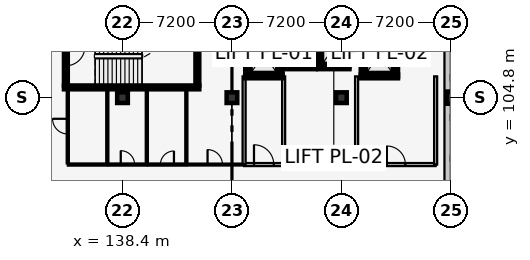
"""IFC4 building model, lengths in metres.
Left out: names, types, materials, properties, quantities, classifications, styles, units other than length and angle.
Written with IfcOpenShell. Run it as: python <this file> out.ifc"""

import sys

from ifc_helpers import new_model, si_unit, direction, frame, frame_2d, origin, origin_2d, place, context, subcontext, project, spatial, rectangle, extrude, element, fill, save


model = new_model("IFC4")
c1 = context("Model", 3, precision=1e-05, world=origin(), true_north=direction((0.0, 1.0)))
c2 = subcontext(c1, "Body", "Model", "MODEL_VIEW")
j1 = project(units=[si_unit("LENGTHUNIT", "METRE"), si_unit("PLANEANGLEUNIT", "RADIAN")], contexts=[c1])
p1 = place(None, origin())
s1 = spatial("IfcSite", under=j1, at=p1, CompositionType="ELEMENT")
p2 = place(p1, origin())
s2 = spatial("IfcBuilding", under=s1, at=p2, CompositionType="ELEMENT")
p3 = place(p2, frame((0.0, 0.0, 18.0)))
s3 = spatial("IfcBuildingStorey", under=s2, at=p3, CompositionType="ELEMENT", Elevation=18.0)
for number, where, z_axis, x_axis in (
    (1, (138.4, 104.8, 0.0), (0.0, 0.0, 1.0), (1.0, 0.0, 0.0)),
    (2, (145.6, 104.8, 0.0), (0.0, 0.0, 1.0), (1.0, 0.0, 0.0)),
    (3, (152.8, 104.8, 0.0), (0.0, 0.0, 1.0), (1.0, 0.0, 0.0)),
):
    element("IfcColumn", number, at=place(p3, frame(where, z_axis=z_axis, x_axis=x_axis)), inside=s3, PredefinedType="COLUMN", context=c2, shape_type="SweptSolid", body=[
        extrude(rectangle(XDim=0.7, YDim=0.7, at=origin_2d()), origin(), (0.0, 0.0, 1.0), 3.9),
    ])
p4 = place(p3, frame((160.0, 104.8, 0.0), z_axis=(0.0, 0.0, 1.0), x_axis=(1.0, 0.0, 0.0)))
e4 = element("IfcColumn", 4, at=p4, inside=s3, PredefinedType="COLUMN", context=c2, shape_type="SweptSolid", body=[
    extrude(rectangle(XDim=0.55, YDim=0.8, at=origin_2d()), origin(), (0.0, 0.0, 1.0), 3.9),
])
p5 = place(p3, frame((159.79, 112.0, 0.0), z_axis=(0.0, 0.0, 1.0), x_axis=(0.0, -1.0, 0.0)))
e5 = element("IfcWall", 5, at=p5, inside=s3, PredefinedType="SOLIDWALL", context=c2, shape_type="SweptSolid", body=[
    extrude(rectangle(XDim=28.8, YDim=0.42, at=frame_2d((14.4, 0.0))), origin(), (0.0, 0.0, 1.0), 3.055),
])
p6 = place(p3, frame((134.55, 105.475, 0.0), z_axis=(0.0, 0.0, 1.0), x_axis=(1.0, 0.0, 0.0)))
e6 = element("IfcWall", 6, at=p6, inside=s3, PredefinedType="SHEAR", context=c2, shape_type="SweptSolid", body=[
    extrude(rectangle(XDim=8.9, YDim=0.25, at=frame_2d((4.45, 0.0))), origin(), (0.0, 0.0, 1.0), 3.66),
])
p7 = place(p3, frame((134.675, 109.45, 0.0), z_axis=(0.0, 0.0, 1.0), x_axis=(0.0, -1.0, 0.0)))
e7 = element("IfcWall", 7, at=p7, inside=s3, PredefinedType="SHEAR", context=c2, shape_type="SweptSolid", body=[
    extrude(rectangle(XDim=3.85, YDim=0.25, at=frame_2d((1.925, 0.0))), origin(), (0.0, 0.0, 1.0), 3.66),
])
p8 = place(p7, frame((1.3, 0.0, 0.0)))
e8 = element("IfcOpeningElement", 8, at=p8, cuts=e7, PredefinedType="OPENING", context=c2, shape_type="SweptSolid", body=[
    extrude(rectangle(XDim=1.25, YDim=2.15, at=frame_2d((0.625, 1.075))), frame((0.0, 0.137, 0.0), z_axis=(0.0, -1.0, 0.0), x_axis=(1.0, 0.0, 0.0)), (0.0, 0.0, 1.0), 0.274),
])
p9 = place(p3, frame((143.325, 105.6, 0.0), z_axis=(0.0, 0.0, 1.0), x_axis=(0.0, 1.0, 0.0)))
e9 = element("IfcWall", 9, at=p9, inside=s3, PredefinedType="SHEAR", context=c2, shape_type="SweptSolid", body=[
    extrude(rectangle(XDim=3.85, YDim=0.25, at=frame_2d((1.925, 0.0))), origin(), (0.0, 0.0, 1.0), 3.66),
])
p10 = place(p3, frame((146.475, 106.2, 0.0), z_axis=(0.0, 0.0, 1.0), x_axis=(1.0, 0.0, 0.0)))
e10 = element("IfcWall", 10, at=p10, inside=s3, PredefinedType="SHEAR", context=c2, shape_type="SweptSolid", body=[
    extrude(rectangle(XDim=2.45, YDim=0.25, at=frame_2d((1.225, 0.0))), origin(), (0.0, 0.0, 1.0), 3.66),
])
p11 = place(p10, frame((0.675, 0.0, 0.0)))
e11 = element("IfcOpeningElement", 11, at=p11, cuts=e10, PredefinedType="OPENING", context=c2, shape_type="SweptSolid", body=[
    extrude(rectangle(XDim=1.1, YDim=2.15, at=frame_2d((0.55, 1.075))), frame((0.0, 0.137, 0.0), z_axis=(0.0, -1.0, 0.0), x_axis=(1.0, 0.0, 0.0)), (0.0, 0.0, 1.0), 0.274),
])
for number, where, z_axis, x_axis in (
    (12, (146.6, 109.2, 0.0), (0.0, 0.0, 1.0), (0.0, -1.0, 0.0)),
    (13, (148.8, 106.2, 0.0), (0.0, 0.0, 1.0), (0.0, 1.0, 0.0)),
):
    element("IfcWall", number, at=place(p3, frame(where, z_axis=z_axis, x_axis=x_axis)), inside=s3, PredefinedType="SHEAR", context=c2, shape_type="SweptSolid", body=[
        extrude(rectangle(XDim=3.0, YDim=0.25, at=frame_2d((1.5, 0.0))), origin(), (0.0, 0.0, 1.0), 3.66),
    ])
p12 = place(p3, frame((146.4, 100.4, 0.0), z_axis=(0.0, 0.0, 1.0), x_axis=(1.0, 0.0, 0.0)))
e14 = element("IfcWall", 14, at=p12, inside=s3, PredefinedType="PARTITIONING", context=c2, shape_type="SweptSolid", body=[
    extrude(rectangle(XDim=2.6, YDim=0.2, at=frame_2d((1.3, 0.0))), origin(), (0.0, 0.0, 1.0), 3.66),
])
p13 = place(p12, frame((0.65, 0.0, 0.0)))
e15 = element("IfcOpeningElement", 15, at=p13, cuts=e14, PredefinedType="OPENING", context=c2, shape_type="SweptSolid", body=[
    extrude(rectangle(XDim=1.3, YDim=2.2, at=frame_2d((0.65, 1.1))), frame((0.0, 0.112, 0.0), z_axis=(0.0, -1.0, 0.0), x_axis=(1.0, 0.0, 0.0)), (0.0, 0.0, 1.0), 0.224),
])
p14 = place(p3, frame((146.4, 106.2, 0.0), z_axis=(0.0, 0.0, 1.0), x_axis=(0.0, -1.0, 0.0)))
e16 = element("IfcWall", 16, at=p14, inside=s3, PredefinedType="PARTITIONING", context=c2, shape_type="SweptSolid", body=[
    extrude(rectangle(XDim=5.8, YDim=0.2, at=frame_2d((2.9, 0.0))), origin(), (0.0, 0.0, 1.0), 3.66),
])
p15 = place(p3, frame((149.0, 100.4, 0.0), z_axis=(0.0, 0.0, 1.0), x_axis=(0.0, 1.0, 0.0)))
e17 = element("IfcWall", 17, at=p15, inside=s3, PredefinedType="PARTITIONING", context=c2, shape_type="SweptSolid", body=[
    extrude(rectangle(XDim=5.8, YDim=0.2, at=frame_2d((2.9, 0.0))), origin(), (0.0, 0.0, 1.0), 3.325),
])
p16 = place(p3, frame((154.075, 106.2, 0.0), z_axis=(0.0, 0.0, 1.0), x_axis=(1.0, 0.0, 0.0)))
e18 = element("IfcWall", 18, at=p16, inside=s3, PredefinedType="SHEAR", context=c2, shape_type="SweptSolid", body=[
    extrude(rectangle(XDim=2.45, YDim=0.25, at=frame_2d((1.225, 0.0))), origin(), (0.0, 0.0, 1.0), 3.66),
])
p17 = place(p16, frame((0.675, 0.0, 0.0)))
e19 = element("IfcOpeningElement", 19, at=p17, cuts=e18, PredefinedType="OPENING", context=c2, shape_type="SweptSolid", body=[
    extrude(rectangle(XDim=1.1, YDim=2.15, at=frame_2d((0.55, 1.075))), frame((0.0, 0.137, 0.0), z_axis=(0.0, -1.0, 0.0), x_axis=(1.0, 0.0, 0.0)), (0.0, 0.0, 1.0), 0.274),
])
for number, where, z_axis, x_axis in (
    (20, (154.2, 109.2, 0.0), (0.0, 0.0, 1.0), (0.0, -1.0, 0.0)),
    (21, (156.4, 106.2, 0.0), (0.0, 0.0, 1.0), (0.0, 1.0, 0.0)),
):
    element("IfcWall", number, at=place(p3, frame(where, z_axis=z_axis, x_axis=x_axis)), inside=s3, PredefinedType="SHEAR", context=c2, shape_type="SweptSolid", body=[
        extrude(rectangle(XDim=3.0, YDim=0.25, at=frame_2d((1.5, 0.0))), origin(), (0.0, 0.0, 1.0), 3.66),
    ])
p18 = place(p3, frame((153.8, 100.4, 0.0), z_axis=(0.0, 0.0, 1.0), x_axis=(1.0, 0.0, 0.0)))
e22 = element("IfcWall", 22, at=p18, inside=s3, PredefinedType="PARTITIONING", context=c2, shape_type="SweptSolid", body=[
    extrude(rectangle(XDim=5.2, YDim=0.2, at=frame_2d((2.6, 0.0))), origin(), (0.0, 0.0, 1.0), 3.66),
])
p19 = place(p18, frame((1.99, 0.0, 0.0)))
e23 = element("IfcOpeningElement", 23, at=p19, cuts=e22, PredefinedType="OPENING", context=c2, shape_type="SweptSolid", body=[
    extrude(rectangle(XDim=1.22, YDim=2.2, at=frame_2d((0.61, 1.1))), frame((0.0, 0.112, 0.0), z_axis=(0.0, -1.0, 0.0), x_axis=(1.0, 0.0, 0.0)), (0.0, 0.0, 1.0), 0.224),
])
for number, where, z_axis, x_axis in (
    (24, (153.8, 106.2, 0.0), (0.0, 0.0, 1.0), (0.0, -1.0, 0.0)),
    (25, (159.0, 100.4, 0.0), (0.0, 0.0, 1.0), (0.0, 1.0, 0.0)),
):
    element("IfcWall", number, at=place(p3, frame(where, z_axis=z_axis, x_axis=x_axis)), inside=s3, PredefinedType="PARTITIONING", context=c2, shape_type="SweptSolid", body=[
        extrude(rectangle(XDim=5.8, YDim=0.2, at=frame_2d((2.9, 0.0))), origin(), (0.0, 0.0, 1.0), 3.66),
    ])
p20 = place(p3, frame((149.075, 106.8, 0.0), z_axis=(0.0, 0.0, 1.0), x_axis=(1.0, 0.0, 0.0)))
e26 = element("IfcWall", 26, at=p20, inside=s3, PredefinedType="SHEAR", context=c2, shape_type="SweptSolid", body=[
    extrude(rectangle(XDim=2.05, YDim=0.25, at=frame_2d((1.025, 0.0))), origin(), (0.0, 0.0, 1.0), 3.66),
])
p21 = place(p20, frame((0.525, 0.0, 0.0)))
e27 = element("IfcOpeningElement", 27, at=p21, cuts=e26, PredefinedType="OPENING", context=c2, shape_type="SweptSolid", body=[
    extrude(rectangle(XDim=1.0, YDim=2.15, at=frame_2d((0.5, 1.075))), frame((0.0, 0.137, 0.0), z_axis=(0.0, -1.0, 0.0), x_axis=(1.0, 0.0, 0.0)), (0.0, 0.0, 1.0), 0.274),
])
for number, where, z_axis, x_axis in (
    (28, (149.2, 109.4, 0.0), (0.0, 0.0, 1.0), (0.0, -1.0, 0.0)),
    (29, (151.0, 106.8, 0.0), (0.0, 0.0, 1.0), (0.0, 1.0, 0.0)),
):
    element("IfcWall", number, at=place(p3, frame(where, z_axis=z_axis, x_axis=x_axis)), inside=s3, PredefinedType="SHEAR", context=c2, shape_type="SweptSolid", body=[
        extrude(rectangle(XDim=2.6, YDim=0.25, at=frame_2d((1.3, 0.0))), origin(), (0.0, 0.0, 1.0), 3.66),
    ])
p22 = place(p3, frame((151.275, 106.8, 0.0), z_axis=(0.0, 0.0, 1.0), x_axis=(1.0, 0.0, 0.0)))
e30 = element("IfcWall", 30, at=p22, inside=s3, PredefinedType="SHEAR", context=c2, shape_type="SweptSolid", body=[
    extrude(rectangle(XDim=2.05, YDim=0.25, at=frame_2d((1.025, 0.0))), origin(), (0.0, 0.0, 1.0), 3.66),
])
p23 = place(p22, frame((0.525, 0.0, 0.0)))
e31 = element("IfcOpeningElement", 31, at=p23, cuts=e30, PredefinedType="OPENING", context=c2, shape_type="SweptSolid", body=[
    extrude(rectangle(XDim=1.0, YDim=2.15, at=frame_2d((0.5, 1.075))), frame((0.0, 0.137, 0.0), z_axis=(0.0, -1.0, 0.0), x_axis=(1.0, 0.0, 0.0)), (0.0, 0.0, 1.0), 0.274),
])
for number, where, z_axis, x_axis in (
    (32, (151.4, 109.4, 0.0), (0.0, 0.0, 1.0), (0.0, -1.0, 0.0)),
    (33, (153.2, 106.8, 0.0), (0.0, 0.0, 1.0), (0.0, 1.0, 0.0)),
):
    element("IfcWall", number, at=place(p3, frame(where, z_axis=z_axis, x_axis=x_axis)), inside=s3, PredefinedType="SHEAR", context=c2, shape_type="SweptSolid", body=[
        extrude(rectangle(XDim=2.6, YDim=0.25, at=frame_2d((1.3, 0.0))), origin(), (0.0, 0.0, 1.0), 3.66),
    ])
p24 = place(p3, frame((134.8, 100.4, 0.0), z_axis=(0.0, 0.0, 1.0), x_axis=(1.0, 0.0, 0.0)))
e34 = element("IfcWall", 34, at=p24, inside=s3, PredefinedType="PARTITIONING", context=c2, shape_type="SweptSolid", body=[
    extrude(rectangle(XDim=2.6, YDim=0.14, at=frame_2d((1.3, 0.0))), origin(), (0.0, 0.0, 1.0), 3.66),
])
p25 = place(p3, frame((134.8, 100.48, 0.0), z_axis=(0.0, 0.0, 1.0), x_axis=(0.0, 1.0, 0.0)))
e35 = element("IfcWall", 35, at=p25, inside=s3, PredefinedType="PARTITIONING", context=c2, shape_type="SweptSolid", body=[
    extrude(rectangle(XDim=4.86, YDim=0.14, at=frame_2d((2.43, 0.0))), origin(), (0.0, 0.0, 1.0), 3.445),
])
p26 = place(p25, frame((1.93, 0.0, 0.0)))
e36 = element("IfcOpeningElement", 36, at=p26, cuts=e35, PredefinedType="OPENING", context=c2, shape_type="SweptSolid", body=[
    extrude(rectangle(XDim=1.0, YDim=2.1, at=frame_2d((0.5, 1.05))), frame((0.0, 0.082, 0.0), z_axis=(0.0, -1.0, 0.0), x_axis=(1.0, 0.0, 0.0)), (0.0, 0.0, 1.0), 0.164),
])
p27 = place(p3, frame((137.4, 100.48, 0.0), z_axis=(0.0, 0.0, 1.0), x_axis=(0.0, 1.0, 0.0)))
e37 = element("IfcWall", 37, at=p27, inside=s3, PredefinedType="PARTITIONING", context=c2, shape_type="SweptSolid", body=[
    extrude(rectangle(XDim=4.86, YDim=0.14, at=frame_2d((2.43, 0.0))), origin(), (0.0, 0.0, 1.0), 3.66),
])
p28 = place(p3, frame((137.48, 100.4, 0.0), z_axis=(0.0, 0.0, 1.0), x_axis=(1.0, 0.0, 0.0)))
e38 = element("IfcWall", 38, at=p28, inside=s3, PredefinedType="PARTITIONING", context=c2, shape_type="SweptSolid", body=[
    extrude(rectangle(XDim=2.52, YDim=0.14, at=frame_2d((1.26, 0.0))), origin(), (0.0, 0.0, 1.0), 3.66),
])
p29 = place(p28, frame((0.805, 0.0, 0.0)))
e39 = element("IfcOpeningElement", 39, at=p29, cuts=e38, PredefinedType="OPENING", context=c2, shape_type="SweptSolid", body=[
    extrude(rectangle(XDim=0.91, YDim=2.06, at=frame_2d((0.455, 1.03))), frame((0.0, 0.082, 0.0), z_axis=(0.0, -1.0, 0.0), x_axis=(1.0, 0.0, 0.0)), (0.0, 0.0, 1.0), 0.164),
])
p30 = place(p3, frame((140.0, 100.48, 0.0), z_axis=(0.0, 0.0, 1.0), x_axis=(0.0, 1.0, 0.0)))
e40 = element("IfcWall", 40, at=p30, inside=s3, PredefinedType="PARTITIONING", context=c2, shape_type="SweptSolid", body=[
    extrude(rectangle(XDim=4.86, YDim=0.14, at=frame_2d((2.43, 0.0))), origin(), (0.0, 0.0, 1.0), 3.66),
])
p31 = place(p3, frame((140.08, 100.4, 0.0), z_axis=(0.0, 0.0, 1.0), x_axis=(1.0, 0.0, 0.0)))
e41 = element("IfcWall", 41, at=p31, inside=s3, PredefinedType="PARTITIONING", context=c2, shape_type="SweptSolid", body=[
    extrude(rectangle(XDim=2.52, YDim=0.14, at=frame_2d((1.26, 0.0))), origin(), (0.0, 0.0, 1.0), 3.66),
])
p32 = place(p31, frame((0.815, 0.0, 0.0)))
e42 = element("IfcOpeningElement", 42, at=p32, cuts=e41, PredefinedType="OPENING", context=c2, shape_type="SweptSolid", body=[
    extrude(rectangle(XDim=0.89, YDim=2.05, at=frame_2d((0.445, 1.025))), frame((0.0, 0.082, 0.0), z_axis=(0.0, -1.0, 0.0), x_axis=(1.0, 0.0, 0.0)), (0.0, 0.0, 1.0), 0.164),
])
p33 = place(p3, frame((142.6, 100.48, 0.0), z_axis=(0.0, 0.0, 1.0), x_axis=(0.0, 1.0, 0.0)))
e43 = element("IfcWall", 43, at=p33, inside=s3, PredefinedType="PARTITIONING", context=c2, shape_type="SweptSolid", body=[
    extrude(rectangle(XDim=4.86, YDim=0.14, at=frame_2d((2.43, 0.0))), origin(), (0.0, 0.0, 1.0), 3.66),
])
p34 = place(p3, frame((142.68, 100.4, 0.0), z_axis=(0.0, 0.0, 1.0), x_axis=(1.0, 0.0, 0.0)))
e44 = element("IfcWall", 44, at=p34, inside=s3, PredefinedType="PARTITIONING", context=c2, shape_type="SweptSolid", body=[
    extrude(rectangle(XDim=3.61, YDim=0.125, at=frame_2d((1.805, 0.0))), origin(), (0.0, 0.0, 1.0), 3.66),
])
p35 = place(p34, frame((1.315, 0.0, 0.0)))
e45 = element("IfcOpeningElement", 45, at=p35, cuts=e44, PredefinedType="OPENING", context=c2, shape_type="SweptSolid", body=[
    extrude(rectangle(XDim=0.98, YDim=2.12, at=frame_2d((0.49, 1.06))), frame((0.0, 0.074, 0.0), z_axis=(0.0, -1.0, 0.0), x_axis=(1.0, 0.0, 0.0)), (0.0, 0.0, 1.0), 0.149),
])
p36 = place(p8, origin())
e46 = element("IfcDoor", 46, at=p36, inside=s3, OperationType="SINGLE_SWING_LEFT", PredefinedType="DOOR", context=c2, shape_type="SweptSolid", body=[
    extrude(rectangle(XDim=1.25, YDim=2.15, at=frame_2d((0.625, 1.075))), frame((0.0, 0.025, 0.0), z_axis=(0.0, -1.0, 0.0), x_axis=(1.0, 0.0, 0.0)), (0.0, 0.0, 1.0), 0.05),
])
fill(e8, e46)
p37 = place(p11, origin())
e47 = element("IfcDoor", 47, at=p37, inside=s3, OperationType="SLIDING_TO_LEFT", PredefinedType="DOOR", context=c2, shape_type="SweptSolid", body=[
    extrude(rectangle(XDim=1.1, YDim=2.15, at=frame_2d((0.55, 1.075))), frame((0.0, 0.025, 0.0), z_axis=(0.0, -1.0, 0.0), x_axis=(1.0, 0.0, 0.0)), (0.0, 0.0, 1.0), 0.05),
])
fill(e11, e47)
p38 = place(p13, origin())
e48 = element("IfcDoor", 48, at=p38, inside=s3, OperationType="SINGLE_SWING_LEFT", PredefinedType="DOOR", context=c2, shape_type="SweptSolid", body=[
    extrude(rectangle(XDim=1.3, YDim=2.2, at=frame_2d((0.65, 1.1))), frame((0.0, 0.025, 0.0), z_axis=(0.0, -1.0, 0.0), x_axis=(1.0, 0.0, 0.0)), (0.0, 0.0, 1.0), 0.05),
])
fill(e15, e48)
p39 = place(p17, origin())
e49 = element("IfcDoor", 49, at=p39, inside=s3, OperationType="SLIDING_TO_LEFT", PredefinedType="DOOR", context=c2, shape_type="SweptSolid", body=[
    extrude(rectangle(XDim=1.1, YDim=2.15, at=frame_2d((0.55, 1.075))), frame((0.0, 0.025, 0.0), z_axis=(0.0, -1.0, 0.0), x_axis=(1.0, 0.0, 0.0)), (0.0, 0.0, 1.0), 0.05),
])
fill(e19, e49)
p40 = place(p19, origin())
e50 = element("IfcDoor", 50, at=p40, inside=s3, OperationType="SINGLE_SWING_LEFT", PredefinedType="DOOR", context=c2, shape_type="SweptSolid", body=[
    extrude(rectangle(XDim=1.22, YDim=2.2, at=frame_2d((0.61, 1.1))), frame((0.0, 0.025, 0.0), z_axis=(0.0, -1.0, 0.0), x_axis=(1.0, 0.0, 0.0)), (0.0, 0.0, 1.0), 0.05),
])
fill(e23, e50)
p41 = place(p21, origin())
e51 = element("IfcDoor", 51, at=p41, inside=s3, OperationType="SLIDING_TO_LEFT", PredefinedType="DOOR", context=c2, shape_type="SweptSolid", body=[
    extrude(rectangle(XDim=1.0, YDim=2.15, at=frame_2d((0.5, 1.075))), frame((0.0, 0.025, 0.0), z_axis=(0.0, -1.0, 0.0), x_axis=(1.0, 0.0, 0.0)), (0.0, 0.0, 1.0), 0.05),
])
fill(e27, e51)
p42 = place(p23, origin())
e52 = element("IfcDoor", 52, at=p42, inside=s3, OperationType="SLIDING_TO_LEFT", PredefinedType="DOOR", context=c2, shape_type="SweptSolid", body=[
    extrude(rectangle(XDim=1.0, YDim=2.15, at=frame_2d((0.5, 1.075))), frame((0.0, 0.025, 0.0), z_axis=(0.0, -1.0, 0.0), x_axis=(1.0, 0.0, 0.0)), (0.0, 0.0, 1.0), 0.05),
])
fill(e31, e52)
p43 = place(p26, origin())
e53 = element("IfcDoor", 53, at=p43, inside=s3, OperationType="SINGLE_SWING_RIGHT", PredefinedType="DOOR", context=c2, shape_type="SweptSolid", body=[
    extrude(rectangle(XDim=1.0, YDim=2.1, at=frame_2d((0.5, 1.05))), frame((0.0, 0.025, 0.0), z_axis=(0.0, -1.0, 0.0), x_axis=(1.0, 0.0, 0.0)), (0.0, 0.0, 1.0), 0.05),
])
fill(e36, e53)
p44 = place(p29, origin())
e54 = element("IfcDoor", 54, at=p44, inside=s3, OperationType="SINGLE_SWING_LEFT", PredefinedType="DOOR", context=c2, shape_type="SweptSolid", body=[
    extrude(rectangle(XDim=0.91, YDim=2.06, at=frame_2d((0.455, 1.03))), frame((0.0, 0.025, 0.0), z_axis=(0.0, -1.0, 0.0), x_axis=(1.0, 0.0, 0.0)), (0.0, 0.0, 1.0), 0.05),
])
fill(e39, e54)
p45 = place(p32, origin())
e55 = element("IfcDoor", 55, at=p45, inside=s3, OperationType="SINGLE_SWING_RIGHT", PredefinedType="DOOR", context=c2, shape_type="SweptSolid", body=[
    extrude(rectangle(XDim=0.89, YDim=2.05, at=frame_2d((0.445, 1.025))), frame((0.0, 0.025, 0.0), z_axis=(0.0, -1.0, 0.0), x_axis=(1.0, 0.0, 0.0)), (0.0, 0.0, 1.0), 0.05),
])
fill(e42, e55)
p46 = place(p35, origin())
e56 = element("IfcDoor", 56, at=p46, inside=s3, OperationType="SINGLE_SWING_LEFT", PredefinedType="DOOR", context=c2, shape_type="SweptSolid", body=[
    extrude(rectangle(XDim=0.98, YDim=2.12, at=frame_2d((0.49, 1.06))), frame((0.0, 0.025, 0.0), z_axis=(0.0, -1.0, 0.0), x_axis=(1.0, 0.0, 0.0)), (0.0, 0.0, 1.0), 0.05),
])
fill(e45, e56)
save(model, sys.argv[1])
